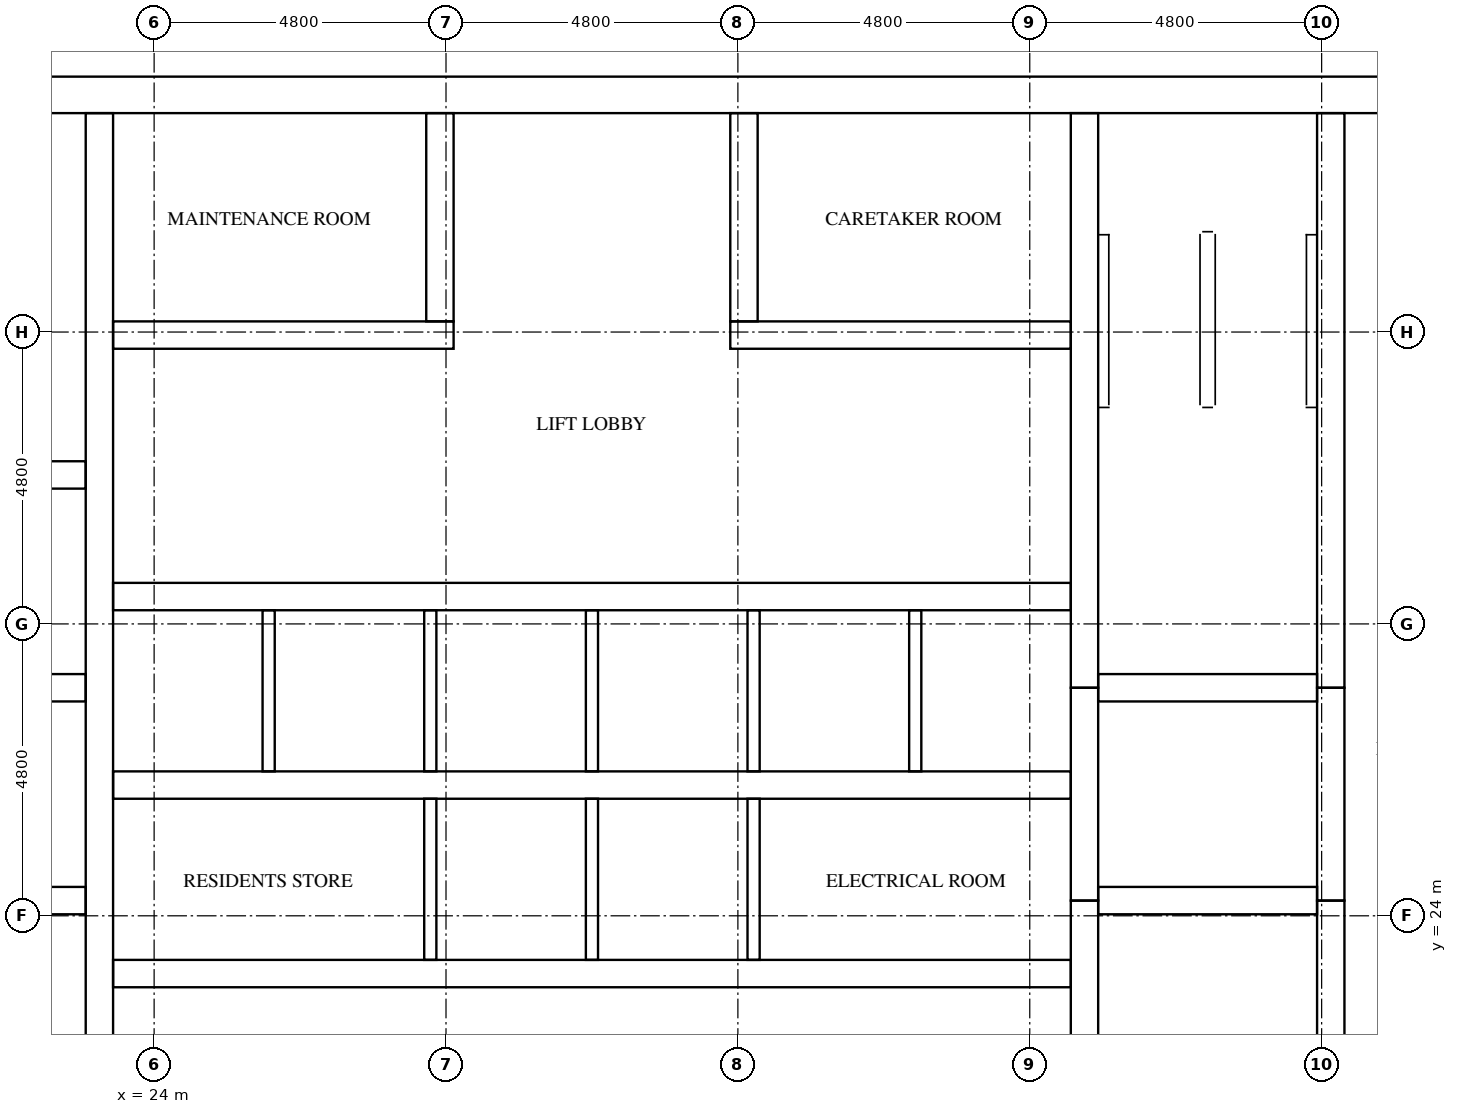
"""IFC4 building model, lengths in metres.
Left out: names, types, materials, properties, quantities, classifications, styles, units other than length and angle.
Written with IfcOpenShell. Run it as: python <this file> out.ifc"""

import sys

from ifc_helpers import new_model, si_unit, direction, frame, frame_2d, origin, place, context, subcontext, project, spatial, rectangle, extrude, element, fill, save


model = new_model("IFC4")
c1 = context("Model", 3, precision=1e-05, world=origin(), true_north=direction((0.0, 1.0)))
c2 = subcontext(c1, "Body", "Model", "MODEL_VIEW")
j1 = project(units=[si_unit("LENGTHUNIT", "METRE"), si_unit("PLANEANGLEUNIT", "RADIAN")], contexts=[c1])
p1 = place(None, origin())
s1 = spatial("IfcSite", under=j1, at=p1, CompositionType="ELEMENT")
p2 = place(p1, origin())
s2 = spatial("IfcBuilding", under=s1, at=p2, CompositionType="ELEMENT")
p3 = place(p2, frame((0.0, 0.0, 242.2)))
s3 = spatial("IfcBuildingStorey", under=s2, at=p3, CompositionType="ELEMENT", Elevation=242.2)
p4 = place(p3, frame((15.0, 37.5, 0.0), z_axis=(0.0, 0.0, 1.0), x_axis=(1.0, 0.0, 0.0)))
e1 = element("IfcWall", 1, at=p4, inside=s3, PredefinedType="SHEAR", context=c2, shape_type="SweptSolid", body=[
    extrude(rectangle(XDim=32.4, YDim=0.6, at=frame_2d((16.2, 0.0))), origin(), (0.0, 0.0, 1.0), 3.2),
])
p5 = place(p4, frame((15.3, 0.0, 0.0)))
e2 = element("IfcOpeningElement", 2, at=p5, cuts=e1, PredefinedType="OPENING", context=c2, shape_type="SweptSolid", body=[
    extrude(rectangle(XDim=1.8, YDim=2.1, at=frame_2d((0.9, 1.05))), frame((0.0, 0.31, 0.0), z_axis=(0.0, -1.0, 0.0), x_axis=(1.0, 0.0, 0.0)), (0.0, 0.0, 1.0), 0.62),
])
p6 = place(p4, frame((1.25, 0.0, 0.0)))
e3 = element("IfcOpeningElement", 3, at=p6, cuts=e1, PredefinedType="OPENING", context=c2, shape_type="SweptSolid", body=[
    extrude(rectangle(XDim=1.0, YDim=2.1, at=frame_2d((0.5, 1.05))), frame((0.0, 0.31, 0.0), z_axis=(0.0, -1.0, 0.0), x_axis=(1.0, 0.0, 0.0)), (0.0, 0.0, 1.0), 0.62),
])
p7 = place(p4, frame((4.988, 0.0, 0.0)))
e4 = element("IfcOpeningElement", 4, at=p7, cuts=e1, PredefinedType="OPENING", context=c2, shape_type="SweptSolid", body=[
    extrude(rectangle(XDim=1.0, YDim=2.1, at=frame_2d((0.5, 1.05))), frame((0.0, 0.31, 0.0), z_axis=(0.0, -1.0, 0.0), x_axis=(1.0, 0.0, 0.0)), (0.0, 0.0, 1.0), 0.62),
])
p8 = place(p3, frame((23.1, 15.6, 0.0), z_axis=(0.0, 0.0, 1.0), x_axis=(0.0, 1.0, 0.0)))
e5 = element("IfcWall", 5, at=p8, inside=s3, PredefinedType="SHEAR", context=c2, shape_type="SweptSolid", body=[
    extrude(rectangle(XDim=21.6, YDim=0.45, at=frame_2d((10.8, 0.0))), origin(), (0.0, 0.0, 1.0), 3.2),
])
p9 = place(p3, frame((39.3, 15.6, 0.0), z_axis=(0.0, 0.0, 1.0), x_axis=(0.0, 1.0, 0.0)))
e6 = element("IfcWall", 6, at=p9, inside=s3, PredefinedType="SHEAR", context=c2, shape_type="SweptSolid", body=[
    extrude(rectangle(XDim=8.65, YDim=0.45, at=frame_2d((4.325, 0.0))), origin(), (0.0, 0.0, 1.0), 3.2),
])
p10 = place(p3, frame((39.3, 24.25, 0.0), z_axis=(0.0, 0.0, 1.0), x_axis=(0.0, 1.0, 0.0)))
e7 = element("IfcWall", 7, at=p10, inside=s3, PredefinedType="SHEAR", context=c2, shape_type="SweptSolid", body=[
    extrude(rectangle(XDim=3.5, YDim=0.45, at=frame_2d((1.75, 0.0))), origin(), (0.0, 0.0, 1.0), 3.2),
])
p11 = place(p3, frame((39.3, 27.75, 0.0), z_axis=(0.0, 0.0, 1.0), x_axis=(0.0, 1.0, 0.0)))
e8 = element("IfcWall", 8, at=p11, inside=s3, PredefinedType="SHEAR", context=c2, shape_type="SweptSolid", body=[
    extrude(rectangle(XDim=9.45, YDim=0.45, at=frame_2d((4.725, 0.0))), origin(), (0.0, 0.0, 1.0), 3.2),
])
p12 = place(p3, frame((43.35, 15.6, 0.0), z_axis=(0.0, 0.0, 1.0), x_axis=(0.0, 1.0, 0.0)))
e9 = element("IfcWall", 9, at=p12, inside=s3, PredefinedType="SHEAR", context=c2, shape_type="SweptSolid", body=[
    extrude(rectangle(XDim=8.65, YDim=0.45, at=frame_2d((4.325, 0.0))), origin(), (0.0, 0.0, 1.0), 3.2),
])
p13 = place(p12, frame((0.6, 0.0, 0.0)))
e10 = element("IfcOpeningElement", 10, at=p13, cuts=e9, PredefinedType="OPENING", context=c2, shape_type="SweptSolid", body=[
    extrude(rectangle(XDim=1.2, YDim=2.1, at=frame_2d((0.6, 1.05))), frame((0.0, 0.235, 0.0), z_axis=(0.0, -1.0, 0.0), x_axis=(1.0, 0.0, 0.0)), (0.0, 0.0, 1.0), 0.47),
])
p14 = place(p3, frame((43.35, 24.25, 0.0), z_axis=(0.0, 0.0, 1.0), x_axis=(0.0, 1.0, 0.0)))
e11 = element("IfcWall", 11, at=p14, inside=s3, PredefinedType="SHEAR", context=c2, shape_type="SweptSolid", body=[
    extrude(rectangle(XDim=3.5, YDim=0.45, at=frame_2d((1.75, 0.0))), origin(), (0.0, 0.0, 1.0), 3.2),
])
p15 = place(p14, frame((1.2, 0.0, 0.0)))
e12 = element("IfcOpeningElement", 12, at=p15, cuts=e11, PredefinedType="OPENING", context=c2, shape_type="SweptSolid", body=[
    extrude(rectangle(XDim=1.1, YDim=2.1, at=frame_2d((0.55, 1.05))), frame((0.0, 0.235, 0.0), z_axis=(0.0, -1.0, 0.0), x_axis=(1.0, 0.0, 0.0)), (0.0, 0.0, 1.0), 0.47),
])
p16 = place(p3, frame((43.35, 27.75, 0.0), z_axis=(0.0, 0.0, 1.0), x_axis=(0.0, 1.0, 0.0)))
e13 = element("IfcWall", 13, at=p16, inside=s3, PredefinedType="SHEAR", context=c2, shape_type="SweptSolid", body=[
    extrude(rectangle(XDim=9.45, YDim=0.45, at=frame_2d((4.725, 0.0))), origin(), (0.0, 0.0, 1.0), 3.2),
])
p17 = place(p16, frame((7.65, 0.0, 0.0)))
e14 = element("IfcOpeningElement", 14, at=p17, cuts=e13, PredefinedType="OPENING", context=c2, shape_type="SweptSolid", body=[
    extrude(rectangle(XDim=1.2, YDim=2.1, at=frame_2d((0.6, 1.05))), frame((0.0, 0.235, 0.0), z_axis=(0.0, -1.0, 0.0), x_axis=(1.0, 0.0, 0.0)), (0.0, 0.0, 1.0), 0.47),
])
for number, where, z_axis, x_axis in (
    (15, (19.275, 24.25, 0.0), (0.0, 0.0, 1.0), (1.0, 0.0, 0.0)),
    (16, (19.275, 27.75, 0.0), (0.0, 0.0, 1.0), (1.0, 0.0, 0.0)),
):
    element("IfcWall", number, at=place(p3, frame(where, z_axis=z_axis, x_axis=x_axis)), inside=s3, PredefinedType="SHEAR", context=c2, shape_type="SweptSolid", body=[
        extrude(rectangle(XDim=3.6, YDim=0.45, at=frame_2d((1.8, 0.0))), origin(), (0.0, 0.0, 1.0), 3.2),
    ])
p18 = place(p3, frame((15.6, 31.25, 0.0), z_axis=(0.0, 0.0, 1.0), x_axis=(1.0, 0.0, 0.0)))
e17 = element("IfcWall", 17, at=p18, inside=s3, PredefinedType="SHEAR", context=c2, shape_type="SweptSolid", body=[
    extrude(rectangle(XDim=7.275, YDim=0.45, at=frame_2d((3.637, 0.0))), origin(), (0.0, 0.0, 1.0), 3.2),
])
for number, where, z_axis, x_axis in (
    (18, (39.525, 24.25, 0.0), (0.0, 0.0, 1.0), (1.0, 0.0, 0.0)),
    (19, (39.525, 27.75, 0.0), (0.0, 0.0, 1.0), (1.0, 0.0, 0.0)),
):
    element("IfcWall", number, at=place(p3, frame(where, z_axis=z_axis, x_axis=x_axis)), inside=s3, PredefinedType="SHEAR", context=c2, shape_type="SweptSolid", body=[
        extrude(rectangle(XDim=3.6, YDim=0.45, at=frame_2d((1.8, 0.0))), origin(), (0.0, 0.0, 1.0), 3.2),
    ])
p19 = place(p3, frame((23.325, 23.05, 0.0), z_axis=(0.0, 0.0, 1.0), x_axis=(1.0, 0.0, 0.0)))
e20 = element("IfcWall", 20, at=p19, inside=s3, PredefinedType="SHEAR", context=c2, shape_type="SweptSolid", body=[
    extrude(rectangle(XDim=15.75, YDim=0.45, at=frame_2d((7.875, 0.0))), origin(), (0.0, 0.0, 1.0), 3.2),
])
p20 = place(p19, frame((2.058, 0.0, 0.0)))
e21 = element("IfcOpeningElement", 21, at=p20, cuts=e20, PredefinedType="OPENING", context=c2, shape_type="SweptSolid", body=[
    extrude(rectangle(XDim=1.0, YDim=2.1, at=frame_2d((0.5, 1.05))), frame((0.0, 0.235, 0.0), z_axis=(0.0, -1.0, 0.0), x_axis=(1.0, 0.0, 0.0)), (0.0, 0.0, 1.0), 0.47),
])
p21 = place(p19, frame((12.692, 0.0, 0.0)))
e22 = element("IfcOpeningElement", 22, at=p21, cuts=e20, PredefinedType="OPENING", context=c2, shape_type="SweptSolid", body=[
    extrude(rectangle(XDim=1.0, YDim=2.1, at=frame_2d((0.5, 1.05))), frame((0.0, 0.235, 0.0), z_axis=(0.0, -1.0, 0.0), x_axis=(1.0, 0.0, 0.0)), (0.0, 0.0, 1.0), 0.47),
])
p22 = place(p3, frame((23.325, 26.15, 0.0), z_axis=(0.0, 0.0, 1.0), x_axis=(1.0, 0.0, 0.0)))
e23 = element("IfcWall", 23, at=p22, inside=s3, PredefinedType="SHEAR", context=c2, shape_type="SweptSolid", body=[
    extrude(rectangle(XDim=15.75, YDim=0.45, at=frame_2d((7.875, 0.0))), origin(), (0.0, 0.0, 1.0), 3.2),
])
p23 = place(p3, frame((23.325, 29.25, 0.0), z_axis=(0.0, 0.0, 1.0), x_axis=(1.0, 0.0, 0.0)))
e24 = element("IfcWall", 24, at=p23, inside=s3, PredefinedType="SHEAR", context=c2, shape_type="SweptSolid", body=[
    extrude(rectangle(XDim=15.75, YDim=0.45, at=frame_2d((7.875, 0.0))), origin(), (0.0, 0.0, 1.0), 3.2),
])
p24 = place(p23, frame((0.679, 0.0, 0.0)))
e25 = element("IfcOpeningElement", 25, at=p24, cuts=e24, PredefinedType="OPENING", context=c2, shape_type="SweptSolid", body=[
    extrude(rectangle(XDim=1.1, YDim=2.1, at=frame_2d((0.55, 1.05))), frame((0.0, 0.235, 0.0), z_axis=(0.0, -1.0, 0.0), x_axis=(1.0, 0.0, 0.0)), (0.0, 0.0, 1.0), 0.47),
])
p25 = place(p23, frame((3.337, 0.0, 0.0)))
e26 = element("IfcOpeningElement", 26, at=p25, cuts=e24, PredefinedType="OPENING", context=c2, shape_type="SweptSolid", body=[
    extrude(rectangle(XDim=1.1, YDim=2.1, at=frame_2d((0.55, 1.05))), frame((0.0, 0.235, 0.0), z_axis=(0.0, -1.0, 0.0), x_axis=(1.0, 0.0, 0.0)), (0.0, 0.0, 1.0), 0.47),
])
p26 = place(p23, frame((5.996, 0.0, 0.0)))
e27 = element("IfcOpeningElement", 27, at=p26, cuts=e24, PredefinedType="OPENING", context=c2, shape_type="SweptSolid", body=[
    extrude(rectangle(XDim=1.1, YDim=2.1, at=frame_2d((0.55, 1.05))), frame((0.0, 0.235, 0.0), z_axis=(0.0, -1.0, 0.0), x_axis=(1.0, 0.0, 0.0)), (0.0, 0.0, 1.0), 0.47),
])
p27 = place(p23, frame((8.654, 0.0, 0.0)))
e28 = element("IfcOpeningElement", 28, at=p27, cuts=e24, PredefinedType="OPENING", context=c2, shape_type="SweptSolid", body=[
    extrude(rectangle(XDim=1.1, YDim=2.1, at=frame_2d((0.55, 1.05))), frame((0.0, 0.235, 0.0), z_axis=(0.0, -1.0, 0.0), x_axis=(1.0, 0.0, 0.0)), (0.0, 0.0, 1.0), 0.47),
])
p28 = place(p23, frame((11.312, 0.0, 0.0)))
e29 = element("IfcOpeningElement", 29, at=p28, cuts=e24, PredefinedType="OPENING", context=c2, shape_type="SweptSolid", body=[
    extrude(rectangle(XDim=1.1, YDim=2.1, at=frame_2d((0.55, 1.05))), frame((0.0, 0.235, 0.0), z_axis=(0.0, -1.0, 0.0), x_axis=(1.0, 0.0, 0.0)), (0.0, 0.0, 1.0), 0.47),
])
p29 = place(p23, frame((13.971, 0.0, 0.0)))
e30 = element("IfcOpeningElement", 30, at=p29, cuts=e24, PredefinedType="OPENING", context=c2, shape_type="SweptSolid", body=[
    extrude(rectangle(XDim=1.1, YDim=2.1, at=frame_2d((0.55, 1.05))), frame((0.0, 0.235, 0.0), z_axis=(0.0, -1.0, 0.0), x_axis=(1.0, 0.0, 0.0)), (0.0, 0.0, 1.0), 0.47),
])
p30 = place(p3, frame((23.325, 33.55, 0.0), z_axis=(0.0, 0.0, 1.0), x_axis=(1.0, 0.0, 0.0)))
e31 = element("IfcWall", 31, at=p30, inside=s3, PredefinedType="SHEAR", context=c2, shape_type="SweptSolid", body=[
    extrude(rectangle(XDim=5.6, YDim=0.45, at=frame_2d((2.8, 0.0))), origin(), (0.0, 0.0, 1.0), 3.2),
])
p31 = place(p30, frame((2.075, 0.0, 0.0)))
e32 = element("IfcOpeningElement", 32, at=p31, cuts=e31, PredefinedType="OPENING", context=c2, shape_type="SweptSolid", body=[
    extrude(rectangle(XDim=1.0, YDim=2.1, at=frame_2d((0.5, 1.05))), frame((0.0, 0.235, 0.0), z_axis=(0.0, -1.0, 0.0), x_axis=(1.0, 0.0, 0.0)), (0.0, 0.0, 1.0), 0.47),
])
p32 = place(p3, frame((33.475, 33.55, 0.0), z_axis=(0.0, 0.0, 1.0), x_axis=(1.0, 0.0, 0.0)))
e33 = element("IfcWall", 33, at=p32, inside=s3, PredefinedType="SHEAR", context=c2, shape_type="SweptSolid", body=[
    extrude(rectangle(XDim=5.6, YDim=0.45, at=frame_2d((2.8, 0.0))), origin(), (0.0, 0.0, 1.0), 3.2),
])
p33 = place(p32, frame((2.525, 0.0, 0.0)))
e34 = element("IfcOpeningElement", 34, at=p33, cuts=e33, PredefinedType="OPENING", context=c2, shape_type="SweptSolid", body=[
    extrude(rectangle(XDim=1.0, YDim=2.1, at=frame_2d((0.5, 1.05))), frame((0.0, 0.235, 0.0), z_axis=(0.0, -1.0, 0.0), x_axis=(1.0, 0.0, 0.0)), (0.0, 0.0, 1.0), 0.47),
])
for number, where, z_axis, x_axis in (
    (35, (28.7, 33.775, 0.0), (0.0, 0.0, 1.0), (0.0, 1.0, 0.0)),
    (36, (33.7, 33.775, 0.0), (0.0, 0.0, 1.0), (0.0, 1.0, 0.0)),
):
    element("IfcWall", number, at=place(p3, frame(where, z_axis=z_axis, x_axis=x_axis)), inside=s3, PredefinedType="SHEAR", context=c2, shape_type="SweptSolid", body=[
        extrude(rectangle(XDim=3.425, YDim=0.45, at=frame_2d((1.712, 0.0))), origin(), (0.0, 0.0, 1.0), 3.2),
    ])
p34 = place(p3, frame((25.883, 26.375, 0.0), z_axis=(0.0, 0.0, 1.0), x_axis=(0.0, 1.0, 0.0)))
e37 = element("IfcWall", 37, at=p34, inside=s3, PredefinedType="SOLIDWALL", context=c2, shape_type="SweptSolid", body=[
    extrude(rectangle(XDim=2.65, YDim=0.2, at=frame_2d((1.325, 0.0))), origin(), (0.0, 0.0, 1.0), 3.2),
])
p35 = place(p3, frame((28.542, 23.275, 0.0), z_axis=(0.0, 0.0, 1.0), x_axis=(0.0, 1.0, 0.0)))
e38 = element("IfcWall", 38, at=p35, inside=s3, PredefinedType="SOLIDWALL", context=c2, shape_type="SweptSolid", body=[
    extrude(rectangle(XDim=2.65, YDim=0.2, at=frame_2d((1.325, 0.0))), origin(), (0.0, 0.0, 1.0), 3.2),
])
p36 = place(p3, frame((28.542, 26.375, 0.0), z_axis=(0.0, 0.0, 1.0), x_axis=(0.0, 1.0, 0.0)))
e39 = element("IfcWall", 39, at=p36, inside=s3, PredefinedType="SOLIDWALL", context=c2, shape_type="SweptSolid", body=[
    extrude(rectangle(XDim=2.65, YDim=0.2, at=frame_2d((1.325, 0.0))), origin(), (0.0, 0.0, 1.0), 3.2),
])
p37 = place(p3, frame((31.2, 23.275, 0.0), z_axis=(0.0, 0.0, 1.0), x_axis=(0.0, 1.0, 0.0)))
e40 = element("IfcWall", 40, at=p37, inside=s3, PredefinedType="SOLIDWALL", context=c2, shape_type="SweptSolid", body=[
    extrude(rectangle(XDim=2.65, YDim=0.2, at=frame_2d((1.325, 0.0))), origin(), (0.0, 0.0, 1.0), 3.2),
])
p38 = place(p3, frame((31.2, 26.375, 0.0), z_axis=(0.0, 0.0, 1.0), x_axis=(0.0, 1.0, 0.0)))
e41 = element("IfcWall", 41, at=p38, inside=s3, PredefinedType="SOLIDWALL", context=c2, shape_type="SweptSolid", body=[
    extrude(rectangle(XDim=2.65, YDim=0.2, at=frame_2d((1.325, 0.0))), origin(), (0.0, 0.0, 1.0), 3.2),
])
p39 = place(p3, frame((33.858, 23.275, 0.0), z_axis=(0.0, 0.0, 1.0), x_axis=(0.0, 1.0, 0.0)))
e42 = element("IfcWall", 42, at=p39, inside=s3, PredefinedType="SOLIDWALL", context=c2, shape_type="SweptSolid", body=[
    extrude(rectangle(XDim=2.65, YDim=0.2, at=frame_2d((1.325, 0.0))), origin(), (0.0, 0.0, 1.0), 3.2),
])
for number, where, z_axis, x_axis in (
    (43, (33.858, 26.375, 0.0), (0.0, 0.0, 1.0), (0.0, 1.0, 0.0)),
    (44, (36.517, 26.375, 0.0), (0.0, 0.0, 1.0), (0.0, 1.0, 0.0)),
):
    element("IfcWall", number, at=place(p3, frame(where, z_axis=z_axis, x_axis=x_axis)), inside=s3, PredefinedType="SOLIDWALL", context=c2, shape_type="SweptSolid", body=[
        extrude(rectangle(XDim=2.65, YDim=0.2, at=frame_2d((1.325, 0.0))), origin(), (0.0, 0.0, 1.0), 3.2),
    ])
p40 = place(p24, origin())
e45 = element("IfcDoor", 45, at=p40, inside=s3, OperationType="DOUBLE_DOOR_SLIDING", PredefinedType="DOOR", context=c2, shape_type="SweptSolid", body=[
    extrude(rectangle(XDim=1.1, YDim=2.1, at=frame_2d((0.55, 1.05))), frame((0.0, 0.025, 0.0), z_axis=(0.0, -1.0, 0.0), x_axis=(1.0, 0.0, 0.0)), (0.0, 0.0, 1.0), 0.05),
])
fill(e25, e45)
p41 = place(p25, origin())
e46 = element("IfcDoor", 46, at=p41, inside=s3, OperationType="DOUBLE_DOOR_SLIDING", PredefinedType="DOOR", context=c2, shape_type="SweptSolid", body=[
    extrude(rectangle(XDim=1.1, YDim=2.1, at=frame_2d((0.55, 1.05))), frame((0.0, 0.025, 0.0), z_axis=(0.0, -1.0, 0.0), x_axis=(1.0, 0.0, 0.0)), (0.0, 0.0, 1.0), 0.05),
])
fill(e26, e46)
p42 = place(p26, origin())
e47 = element("IfcDoor", 47, at=p42, inside=s3, OperationType="DOUBLE_DOOR_SLIDING", PredefinedType="DOOR", context=c2, shape_type="SweptSolid", body=[
    extrude(rectangle(XDim=1.1, YDim=2.1, at=frame_2d((0.55, 1.05))), frame((0.0, 0.025, 0.0), z_axis=(0.0, -1.0, 0.0), x_axis=(1.0, 0.0, 0.0)), (0.0, 0.0, 1.0), 0.05),
])
fill(e27, e47)
p43 = place(p27, origin())
e48 = element("IfcDoor", 48, at=p43, inside=s3, OperationType="DOUBLE_DOOR_SLIDING", PredefinedType="DOOR", context=c2, shape_type="SweptSolid", body=[
    extrude(rectangle(XDim=1.1, YDim=2.1, at=frame_2d((0.55, 1.05))), frame((0.0, 0.025, 0.0), z_axis=(0.0, -1.0, 0.0), x_axis=(1.0, 0.0, 0.0)), (0.0, 0.0, 1.0), 0.05),
])
fill(e28, e48)
p44 = place(p28, origin())
e49 = element("IfcDoor", 49, at=p44, inside=s3, OperationType="DOUBLE_DOOR_SLIDING", PredefinedType="DOOR", context=c2, shape_type="SweptSolid", body=[
    extrude(rectangle(XDim=1.1, YDim=2.1, at=frame_2d((0.55, 1.05))), frame((0.0, 0.025, 0.0), z_axis=(0.0, -1.0, 0.0), x_axis=(1.0, 0.0, 0.0)), (0.0, 0.0, 1.0), 0.05),
])
fill(e29, e49)
p45 = place(p29, origin())
e50 = element("IfcDoor", 50, at=p45, inside=s3, OperationType="DOUBLE_DOOR_SLIDING", PredefinedType="DOOR", context=c2, shape_type="SweptSolid", body=[
    extrude(rectangle(XDim=1.1, YDim=2.1, at=frame_2d((0.55, 1.05))), frame((0.0, 0.025, 0.0), z_axis=(0.0, -1.0, 0.0), x_axis=(1.0, 0.0, 0.0)), (0.0, 0.0, 1.0), 0.05),
])
fill(e30, e50)
p46 = place(p15, origin())
e51 = element("IfcDoor", 51, at=p46, inside=s3, OperationType="DOUBLE_DOOR_SLIDING", PredefinedType="DOOR", context=c2, shape_type="SweptSolid", body=[
    extrude(rectangle(XDim=1.1, YDim=2.1, at=frame_2d((0.55, 1.05))), frame((0.0, 0.025, 0.0), z_axis=(0.0, -1.0, 0.0), x_axis=(1.0, 0.0, 0.0)), (0.0, 0.0, 1.0), 0.05),
])
fill(e12, e51)
p47 = place(p17, origin())
e52 = element("IfcDoor", 52, at=p47, inside=s3, OperationType="SINGLE_SWING_LEFT", PredefinedType="DOOR", context=c2, shape_type="SweptSolid", body=[
    extrude(rectangle(XDim=1.2, YDim=2.1, at=frame_2d((0.6, 1.05))), frame((0.0, 0.025, 0.0), z_axis=(0.0, -1.0, 0.0), x_axis=(1.0, 0.0, 0.0)), (0.0, 0.0, 1.0), 0.05),
])
fill(e14, e52)
p48 = place(p5, origin())
e53 = element("IfcDoor", 53, at=p48, inside=s3, OperationType="DOUBLE_DOOR_SINGLE_SWING", PredefinedType="DOOR", context=c2, shape_type="SweptSolid", body=[
    extrude(rectangle(XDim=1.8, YDim=2.1, at=frame_2d((0.9, 1.05))), frame((0.0, 0.025, 0.0), z_axis=(0.0, -1.0, 0.0), x_axis=(1.0, 0.0, 0.0)), (0.0, 0.0, 1.0), 0.05),
])
fill(e2, e53)
p49 = place(p20, frame((1.0, 0.0, 0.0), z_axis=(0.0, 0.0, 1.0), x_axis=(-1.0, 0.0, 0.0)))
e54 = element("IfcDoor", 54, at=p49, inside=s3, OperationType="SINGLE_SWING_RIGHT", PredefinedType="DOOR", context=c2, shape_type="SweptSolid", body=[
    extrude(rectangle(XDim=1.0, YDim=2.1, at=frame_2d((0.5, 1.05))), frame((0.0, 0.025, 0.0), z_axis=(0.0, -1.0, 0.0), x_axis=(1.0, 0.0, 0.0)), (0.0, 0.0, 1.0), 0.05),
])
fill(e21, e54)
p50 = place(p21, frame((1.0, 0.0, 0.0), z_axis=(0.0, 0.0, 1.0), x_axis=(-1.0, 0.0, 0.0)))
e55 = element("IfcDoor", 55, at=p50, inside=s3, OperationType="SINGLE_SWING_LEFT", PredefinedType="DOOR", context=c2, shape_type="SweptSolid", body=[
    extrude(rectangle(XDim=1.0, YDim=2.1, at=frame_2d((0.5, 1.05))), frame((0.0, 0.025, 0.0), z_axis=(0.0, -1.0, 0.0), x_axis=(1.0, 0.0, 0.0)), (0.0, 0.0, 1.0), 0.05),
])
fill(e22, e55)
p51 = place(p31, frame((1.0, 0.0, 0.0), z_axis=(0.0, 0.0, 1.0), x_axis=(-1.0, 0.0, 0.0)))
e56 = element("IfcDoor", 56, at=p51, inside=s3, OperationType="SINGLE_SWING_RIGHT", PredefinedType="DOOR", context=c2, shape_type="SweptSolid", body=[
    extrude(rectangle(XDim=1.0, YDim=2.1, at=frame_2d((0.5, 1.05))), frame((0.0, 0.025, 0.0), z_axis=(0.0, -1.0, 0.0), x_axis=(1.0, 0.0, 0.0)), (0.0, 0.0, 1.0), 0.05),
])
fill(e32, e56)
p52 = place(p33, frame((1.0, 0.0, 0.0), z_axis=(0.0, 0.0, 1.0), x_axis=(-1.0, 0.0, 0.0)))
e57 = element("IfcDoor", 57, at=p52, inside=s3, OperationType="SINGLE_SWING_LEFT", PredefinedType="DOOR", context=c2, shape_type="SweptSolid", body=[
    extrude(rectangle(XDim=1.0, YDim=2.1, at=frame_2d((0.5, 1.05))), frame((0.0, 0.025, 0.0), z_axis=(0.0, -1.0, 0.0), x_axis=(1.0, 0.0, 0.0)), (0.0, 0.0, 1.0), 0.05),
])
fill(e34, e57)
save(model, sys.argv[1])
